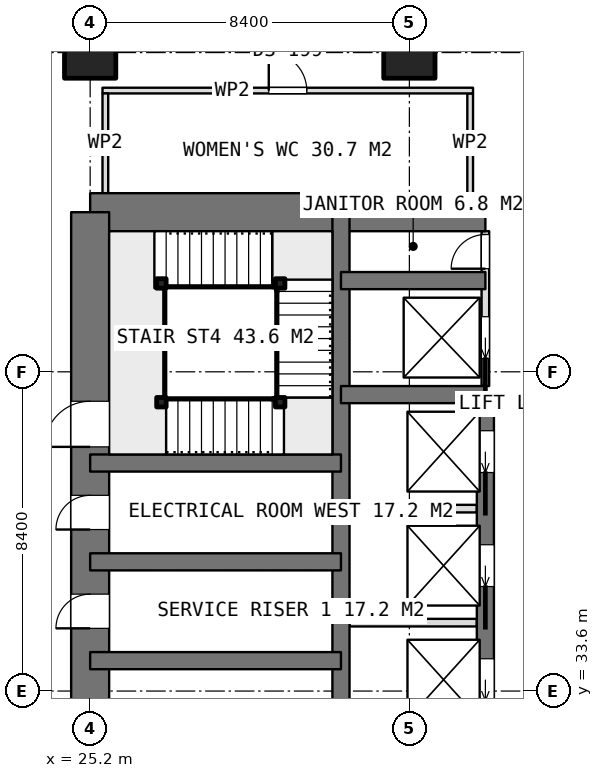
"""IFC4 building model, lengths in metres.
Left out: names, types, materials, properties, quantities, classifications, styles, units other than length and angle.
Written with IfcOpenShell. Run it as: python <this file> out.ifc"""

import sys

from ifc_helpers import new_model, si_unit, direction, frame, frame_2d, origin, origin_2d, place, context, subcontext, project, spatial, rectangle, extrude, element, fill, save


model = new_model("IFC4")
c1 = context("Model", 3, precision=1e-05, world=origin(), true_north=direction((0.0, 1.0)))
c2 = subcontext(c1, "Body", "Model", "MODEL_VIEW")
j1 = project(units=[si_unit("LENGTHUNIT", "METRE"), si_unit("PLANEANGLEUNIT", "RADIAN")], contexts=[c1])
p1 = place(None, origin())
s1 = spatial("IfcSite", under=j1, at=p1, CompositionType="ELEMENT")
p2 = place(p1, origin())
s2 = spatial("IfcBuilding", under=s1, at=p2, CompositionType="ELEMENT")
p3 = place(p2, frame((0.0, 0.0, 187.7)))
s3 = spatial("IfcBuildingStorey", under=s2, at=p3, CompositionType="ELEMENT", Elevation=187.7)
p4 = place(p3, frame((25.2, 46.2, 0.0), z_axis=(0.0, 0.0, 1.0), x_axis=(1.0, 0.0, 0.0)))
e1 = element("IfcWall", 1, at=p4, inside=s3, PredefinedType="SHEAR", context=c2, shape_type="SweptSolid", body=[
    extrude(rectangle(XDim=10.4, YDim=1.0, at=frame_2d((5.2, 0.0))), origin(), (0.0, 0.0, 1.0), 3.75),
])
p5 = place(p3, frame((25.2, 21.0, 0.0), z_axis=(0.0, 0.0, 1.0), x_axis=(0.0, 1.0, 0.0)))
e2 = element("IfcWall", 2, at=p5, inside=s3, PredefinedType="SHEAR", context=c2, shape_type="SweptSolid", body=[
    extrude(rectangle(XDim=25.2, YDim=1.0, at=frame_2d((12.6, 0.0))), origin(), (0.0, 0.0, 1.0), 3.75),
])
p6 = place(p5, frame((7.8, 0.0, 0.0)))
e3 = element("IfcOpeningElement", 3, at=p6, cuts=e2, PredefinedType="OPENING", context=c2, shape_type="SweptSolid", body=[
    extrude(rectangle(XDim=1.2, YDim=2.1, at=frame_2d((0.6, 1.05))), frame((0.0, 0.51, 0.0), z_axis=(0.0, -1.0, 0.0), x_axis=(1.0, 0.0, 0.0)), (0.0, 0.0, 1.0), 1.02),
])
p7 = place(p5, frame((14.25, 0.0, 0.0)))
e4 = element("IfcOpeningElement", 4, at=p7, cuts=e2, PredefinedType="OPENING", context=c2, shape_type="SweptSolid", body=[
    extrude(rectangle(XDim=0.9, YDim=2.1, at=frame_2d((0.45, 1.05))), frame((0.0, 0.51, 0.0), z_axis=(0.0, -1.0, 0.0), x_axis=(1.0, 0.0, 0.0)), (0.0, 0.0, 1.0), 1.02),
])
p8 = place(p5, frame((16.85, 0.0, 0.0)))
e5 = element("IfcOpeningElement", 5, at=p8, cuts=e2, PredefinedType="OPENING", context=c2, shape_type="SweptSolid", body=[
    extrude(rectangle(XDim=0.9, YDim=2.1, at=frame_2d((0.45, 1.05))), frame((0.0, 0.51, 0.0), z_axis=(0.0, -1.0, 0.0), x_axis=(1.0, 0.0, 0.0)), (0.0, 0.0, 1.0), 1.02),
])
p9 = place(p5, frame((19.025, 0.0, 0.0)))
e6 = element("IfcOpeningElement", 6, at=p9, cuts=e2, PredefinedType="OPENING", context=c2, shape_type="SweptSolid", body=[
    extrude(rectangle(XDim=1.2, YDim=2.1, at=frame_2d((0.6, 1.05))), frame((0.0, 0.51, 0.0), z_axis=(0.0, -1.0, 0.0), x_axis=(1.0, 0.0, 0.0)), (0.0, 0.0, 1.0), 1.02),
])
p10 = place(p3, frame((31.8, 21.0, 0.0), z_axis=(0.0, 0.0, 1.0), x_axis=(0.0, 1.0, 0.0)))
e7 = element("IfcWall", 7, at=p10, inside=s3, PredefinedType="SHEAR", context=c2, shape_type="SweptSolid", body=[
    extrude(rectangle(XDim=25.2, YDim=0.45, at=frame_2d((12.6, 0.0))), origin(), (0.0, 0.0, 1.0), 3.75),
])
p11 = place(p3, frame((35.6, 23.4, 0.0), z_axis=(0.0, 0.0, 1.0), x_axis=(0.0, 1.0, 0.0)))
e8 = element("IfcWall", 8, at=p11, inside=s3, PredefinedType="SHEAR", context=c2, shape_type="SweptSolid", body=[
    extrude(rectangle(XDim=18.0, YDim=0.45, at=frame_2d((9.0, 0.0))), origin(), (0.0, 0.0, 1.0), 3.75),
])
p12 = place(p11, frame((0.95, 0.0, 0.0)))
e9 = element("IfcOpeningElement", 9, at=p12, cuts=e8, PredefinedType="OPENING", context=c2, shape_type="SweptSolid", body=[
    extrude(rectangle(XDim=1.1, YDim=2.1, at=frame_2d((0.55, 1.05))), frame((0.0, 0.235, 0.0), z_axis=(0.0, -1.0, 0.0), x_axis=(1.0, 0.0, 0.0)), (0.0, 0.0, 1.0), 0.47),
])
p13 = place(p11, frame((3.95, 0.0, 0.0)))
e10 = element("IfcOpeningElement", 10, at=p13, cuts=e8, PredefinedType="OPENING", context=c2, shape_type="SweptSolid", body=[
    extrude(rectangle(XDim=1.1, YDim=2.1, at=frame_2d((0.55, 1.05))), frame((0.0, 0.235, 0.0), z_axis=(0.0, -1.0, 0.0), x_axis=(1.0, 0.0, 0.0)), (0.0, 0.0, 1.0), 0.47),
])
p14 = place(p11, frame((6.95, 0.0, 0.0)))
e11 = element("IfcOpeningElement", 11, at=p14, cuts=e8, PredefinedType="OPENING", context=c2, shape_type="SweptSolid", body=[
    extrude(rectangle(XDim=1.1, YDim=2.1, at=frame_2d((0.55, 1.05))), frame((0.0, 0.235, 0.0), z_axis=(0.0, -1.0, 0.0), x_axis=(1.0, 0.0, 0.0)), (0.0, 0.0, 1.0), 0.47),
])
p15 = place(p11, frame((9.95, 0.0, 0.0)))
e12 = element("IfcOpeningElement", 12, at=p15, cuts=e8, PredefinedType="OPENING", context=c2, shape_type="SweptSolid", body=[
    extrude(rectangle(XDim=1.1, YDim=2.1, at=frame_2d((0.55, 1.05))), frame((0.0, 0.235, 0.0), z_axis=(0.0, -1.0, 0.0), x_axis=(1.0, 0.0, 0.0)), (0.0, 0.0, 1.0), 0.47),
])
p16 = place(p11, frame((12.95, 0.0, 0.0)))
e13 = element("IfcOpeningElement", 13, at=p16, cuts=e8, PredefinedType="OPENING", context=c2, shape_type="SweptSolid", body=[
    extrude(rectangle(XDim=1.1, YDim=2.1, at=frame_2d((0.55, 1.05))), frame((0.0, 0.235, 0.0), z_axis=(0.0, -1.0, 0.0), x_axis=(1.0, 0.0, 0.0)), (0.0, 0.0, 1.0), 0.47),
])
p17 = place(p11, frame((15.95, 0.0, 0.0)))
e14 = element("IfcOpeningElement", 14, at=p17, cuts=e8, PredefinedType="OPENING", context=c2, shape_type="SweptSolid", body=[
    extrude(rectangle(XDim=1.1, YDim=2.1, at=frame_2d((0.55, 1.05))), frame((0.0, 0.235, 0.0), z_axis=(0.0, -1.0, 0.0), x_axis=(1.0, 0.0, 0.0)), (0.0, 0.0, 1.0), 0.47),
])
for number, where, z_axis, x_axis in (
    (15, (31.8, 41.4, 0.0), (0.0, 0.0, 1.0), (1.0, 0.0, 0.0)),
    (16, (31.8, 44.4, 0.0), (0.0, 0.0, 1.0), (1.0, 0.0, 0.0)),
):
    element("IfcWall", number, at=place(p3, frame(where, z_axis=z_axis, x_axis=x_axis)), inside=s3, PredefinedType="SHEAR", context=c2, shape_type="SweptSolid", body=[
        extrude(rectangle(XDim=3.8, YDim=0.45, at=frame_2d((1.9, 0.0))), origin(), (0.0, 0.0, 1.0), 3.75),
    ])
for number, where, z_axis, x_axis in (
    (17, (25.2, 34.4, 0.0), (0.0, 0.0, 1.0), (1.0, 0.0, 0.0)),
    (18, (25.2, 37.0, 0.0), (0.0, 0.0, 1.0), (1.0, 0.0, 0.0)),
    (19, (25.2, 39.6, 0.0), (0.0, 0.0, 1.0), (1.0, 0.0, 0.0)),
):
    element("IfcWall", number, at=place(p3, frame(where, z_axis=z_axis, x_axis=x_axis)), inside=s3, PredefinedType="SHEAR", context=c2, shape_type="SweptSolid", body=[
        extrude(rectangle(XDim=6.6, YDim=0.45, at=frame_2d((3.3, 0.0))), origin(), (0.0, 0.0, 1.0), 3.75),
    ])
for number, where, z_axis, x_axis in (
    (20, (25.2, 50.4, 0.0), (0.0, 0.0, 1.0), (1.0, 0.0, 0.0)),
    (21, (33.6, 50.4, 0.0), (0.0, 0.0, 1.0), (1.0, 0.0, 0.0)),
):
    element("IfcColumn", number, at=place(p3, frame(where, z_axis=z_axis, x_axis=x_axis)), inside=s3, PredefinedType="COLUMN", context=c2, shape_type="SweptSolid", body=[
        extrude(rectangle(XDim=1.35, YDim=1.35, at=origin_2d()), origin(), (0.0, 0.0, 1.0), 3.75),
    ])
for number, where, z_axis, x_axis in (
    (22, (32.025, 35.4, 0.0), (0.0, 0.0, 1.0), (1.0, 0.0, 0.0)),
    (23, (32.025, 38.4, 0.0), (0.0, 0.0, 1.0), (1.0, 0.0, 0.0)),
):
    element("IfcWall", number, at=place(p3, frame(where, z_axis=z_axis, x_axis=x_axis)), inside=s3, PredefinedType="PARTITIONING", context=c2, shape_type="SweptSolid", body=[
        extrude(rectangle(XDim=3.35, YDim=0.2, at=frame_2d((1.675, 0.0))), origin(), (0.0, 0.0, 1.0), 3.5),
    ])
p18 = place(p3, frame((35.6, 41.625, 0.0), z_axis=(0.0, 0.0, 1.0), x_axis=(0.0, 1.0, 0.0)))
e24 = element("IfcWall", 24, at=p18, inside=s3, PredefinedType="PARTITIONING", context=c2, shape_type="SweptSolid", body=[
    extrude(rectangle(XDim=4.075, YDim=0.2, at=frame_2d((2.038, 0.0))), origin(), (0.0, 0.0, 1.0), 3.5),
])
p19 = place(p18, frame((3.088, 0.0, 0.0)))
e25 = element("IfcOpeningElement", 25, at=p19, cuts=e24, PredefinedType="OPENING", context=c2, shape_type="SweptSolid", body=[
    extrude(rectangle(XDim=0.9, YDim=2.1, at=frame_2d((0.45, 1.05))), frame((0.0, 0.11, 0.0), z_axis=(0.0, -1.0, 0.0), x_axis=(1.0, 0.0, 0.0)), (0.0, 0.0, 1.0), 0.22),
])
p20 = place(p18, frame((0.725, 0.0, 0.0)))
e26 = element("IfcOpeningElement", 26, at=p20, cuts=e24, PredefinedType="OPENING", context=c2, shape_type="SweptSolid", body=[
    extrude(rectangle(XDim=1.1, YDim=2.1, at=frame_2d((0.55, 1.05))), frame((0.0, 0.11, 0.0), z_axis=(0.0, -1.0, 0.0), x_axis=(1.0, 0.0, 0.0)), (0.0, 0.0, 1.0), 0.22),
])
p21 = place(p3, frame((25.525, 49.4, 0.0), z_axis=(0.0, 0.0, 1.0), x_axis=(1.0, 0.0, 0.0)))
e27 = element("IfcWall", 27, at=p21, inside=s3, PredefinedType="PARTITIONING", context=c2, shape_type="SweptSolid", body=[
    extrude(rectangle(XDim=9.75, YDim=0.15, at=frame_2d((4.875, 0.0))), origin(), (0.0, 0.0, 1.0), 3.5),
])
p22 = place(p21, frame((4.375, 0.0, 0.0)))
e28 = element("IfcOpeningElement", 28, at=p22, cuts=e27, PredefinedType="OPENING", context=c2, shape_type="SweptSolid", body=[
    extrude(rectangle(XDim=1.0, YDim=2.1, at=frame_2d((0.5, 1.05))), frame((0.0, 0.085, 0.0), z_axis=(0.0, -1.0, 0.0), x_axis=(1.0, 0.0, 0.0)), (0.0, 0.0, 1.0), 0.17),
])
for number, where, z_axis, x_axis in (
    (29, (25.6, 46.7, 0.0), (0.0, 0.0, 1.0), (0.0, 1.0, 0.0)),
    (30, (35.2, 46.7, 0.0), (0.0, 0.0, 1.0), (0.0, 1.0, 0.0)),
):
    element("IfcWall", number, at=place(p3, frame(where, z_axis=z_axis, x_axis=x_axis)), inside=s3, PredefinedType="PARTITIONING", context=c2, shape_type="SweptSolid", body=[
        extrude(rectangle(XDim=2.625, YDim=0.15, at=frame_2d((1.312, 0.0))), origin(), (0.0, 0.0, 1.0), 3.5),
    ])
for number, where, z_axis, x_axis in (
    (31, (27.075, 41.2, 0.0), (0.0, 0.0, 1.0), (1.0, 0.0, 0.0)),
    (32, (30.2, 41.2, 0.0), (0.0, 0.0, 1.0), (1.0, 0.0, 0.0)),
    (33, (30.2, 44.325, 0.0), (0.0, 0.0, 1.0), (1.0, 0.0, 0.0)),
    (34, (27.075, 44.325, 0.0), (0.0, 0.0, 1.0), (1.0, 0.0, 0.0)),
):
    element("IfcColumn", number, at=place(p3, frame(where, z_axis=z_axis, x_axis=x_axis)), inside=s3, PredefinedType="COLUMN", context=c2, shape_type="SweptSolid", body=[
        extrude(rectangle(XDim=0.25, YDim=0.25, at=origin_2d()), origin(), (0.0, 0.0, 1.0), 3.75),
    ])
p23 = place(p7, origin())
e35 = element("IfcDoor", 35, at=p23, inside=s3, OperationType="SINGLE_SWING_LEFT", PredefinedType="DOOR", context=c2, shape_type="SweptSolid", body=[
    extrude(rectangle(XDim=0.9, YDim=2.1, at=frame_2d((0.45, 1.05))), frame((0.0, 0.025, 0.0), z_axis=(0.0, -1.0, 0.0), x_axis=(1.0, 0.0, 0.0)), (0.0, 0.0, 1.0), 0.05),
])
fill(e4, e35)
p24 = place(p8, origin())
e36 = element("IfcDoor", 36, at=p24, inside=s3, OperationType="SINGLE_SWING_LEFT", PredefinedType="DOOR", context=c2, shape_type="SweptSolid", body=[
    extrude(rectangle(XDim=0.9, YDim=2.1, at=frame_2d((0.45, 1.05))), frame((0.0, 0.025, 0.0), z_axis=(0.0, -1.0, 0.0), x_axis=(1.0, 0.0, 0.0)), (0.0, 0.0, 1.0), 0.05),
])
fill(e5, e36)
p25 = place(p19, origin())
e37 = element("IfcDoor", 37, at=p25, inside=s3, OperationType="SINGLE_SWING_LEFT", PredefinedType="DOOR", context=c2, shape_type="SweptSolid", body=[
    extrude(rectangle(XDim=0.9, YDim=2.1, at=frame_2d((0.45, 1.05))), frame((0.0, 0.025, 0.0), z_axis=(0.0, -1.0, 0.0), x_axis=(1.0, 0.0, 0.0)), (0.0, 0.0, 1.0), 0.05),
])
fill(e25, e37)
p26 = place(p15, origin())
e38 = element("IfcDoor", 38, at=p26, inside=s3, OperationType="SLIDING_TO_LEFT", PredefinedType="USERDEFINED", context=c2, shape_type="SweptSolid", body=[
    extrude(rectangle(XDim=1.1, YDim=2.1, at=frame_2d((0.55, 1.05))), frame((0.0, 0.025, 0.0), z_axis=(0.0, -1.0, 0.0), x_axis=(1.0, 0.0, 0.0)), (0.0, 0.0, 1.0), 0.05),
])
fill(e12, e38)
p27 = place(p16, origin())
e39 = element("IfcDoor", 39, at=p27, inside=s3, OperationType="SLIDING_TO_LEFT", PredefinedType="USERDEFINED", context=c2, shape_type="SweptSolid", body=[
    extrude(rectangle(XDim=1.1, YDim=2.1, at=frame_2d((0.55, 1.05))), frame((0.0, 0.025, 0.0), z_axis=(0.0, -1.0, 0.0), x_axis=(1.0, 0.0, 0.0)), (0.0, 0.0, 1.0), 0.05),
])
fill(e13, e39)
p28 = place(p17, origin())
e40 = element("IfcDoor", 40, at=p28, inside=s3, OperationType="SLIDING_TO_LEFT", PredefinedType="USERDEFINED", context=c2, shape_type="SweptSolid", body=[
    extrude(rectangle(XDim=1.1, YDim=2.1, at=frame_2d((0.55, 1.05))), frame((0.0, 0.025, 0.0), z_axis=(0.0, -1.0, 0.0), x_axis=(1.0, 0.0, 0.0)), (0.0, 0.0, 1.0), 0.05),
])
fill(e14, e40)
p29 = place(p20, origin())
e41 = element("IfcDoor", 41, at=p29, inside=s3, OperationType="SLIDING_TO_LEFT", PredefinedType="USERDEFINED", context=c2, shape_type="SweptSolid", body=[
    extrude(rectangle(XDim=1.1, YDim=2.1, at=frame_2d((0.55, 1.05))), frame((0.0, 0.025, 0.0), z_axis=(0.0, -1.0, 0.0), x_axis=(1.0, 0.0, 0.0)), (0.0, 0.0, 1.0), 0.05),
])
fill(e26, e41)
p30 = place(p22, origin())
e42 = element("IfcDoor", 42, at=p30, inside=s3, OperationType="SINGLE_SWING_LEFT", PredefinedType="DOOR", context=c2, shape_type="SweptSolid", body=[
    extrude(rectangle(XDim=1.0, YDim=2.1, at=frame_2d((0.5, 1.05))), frame((0.0, 0.025, 0.0), z_axis=(0.0, -1.0, 0.0), x_axis=(1.0, 0.0, 0.0)), (0.0, 0.0, 1.0), 0.05),
])
fill(e28, e42)
p31 = place(p9, origin())
e43 = element("IfcDoor", 43, at=p31, inside=s3, OperationType="SINGLE_SWING_RIGHT", PredefinedType="DOOR", context=c2, shape_type="SweptSolid", body=[
    extrude(rectangle(XDim=1.2, YDim=2.1, at=frame_2d((0.6, 1.05))), frame((0.0, 0.025, 0.0), z_axis=(0.0, -1.0, 0.0), x_axis=(1.0, 0.0, 0.0)), (0.0, 0.0, 1.0), 0.05),
])
fill(e6, e43)
save(model, sys.argv[1])
